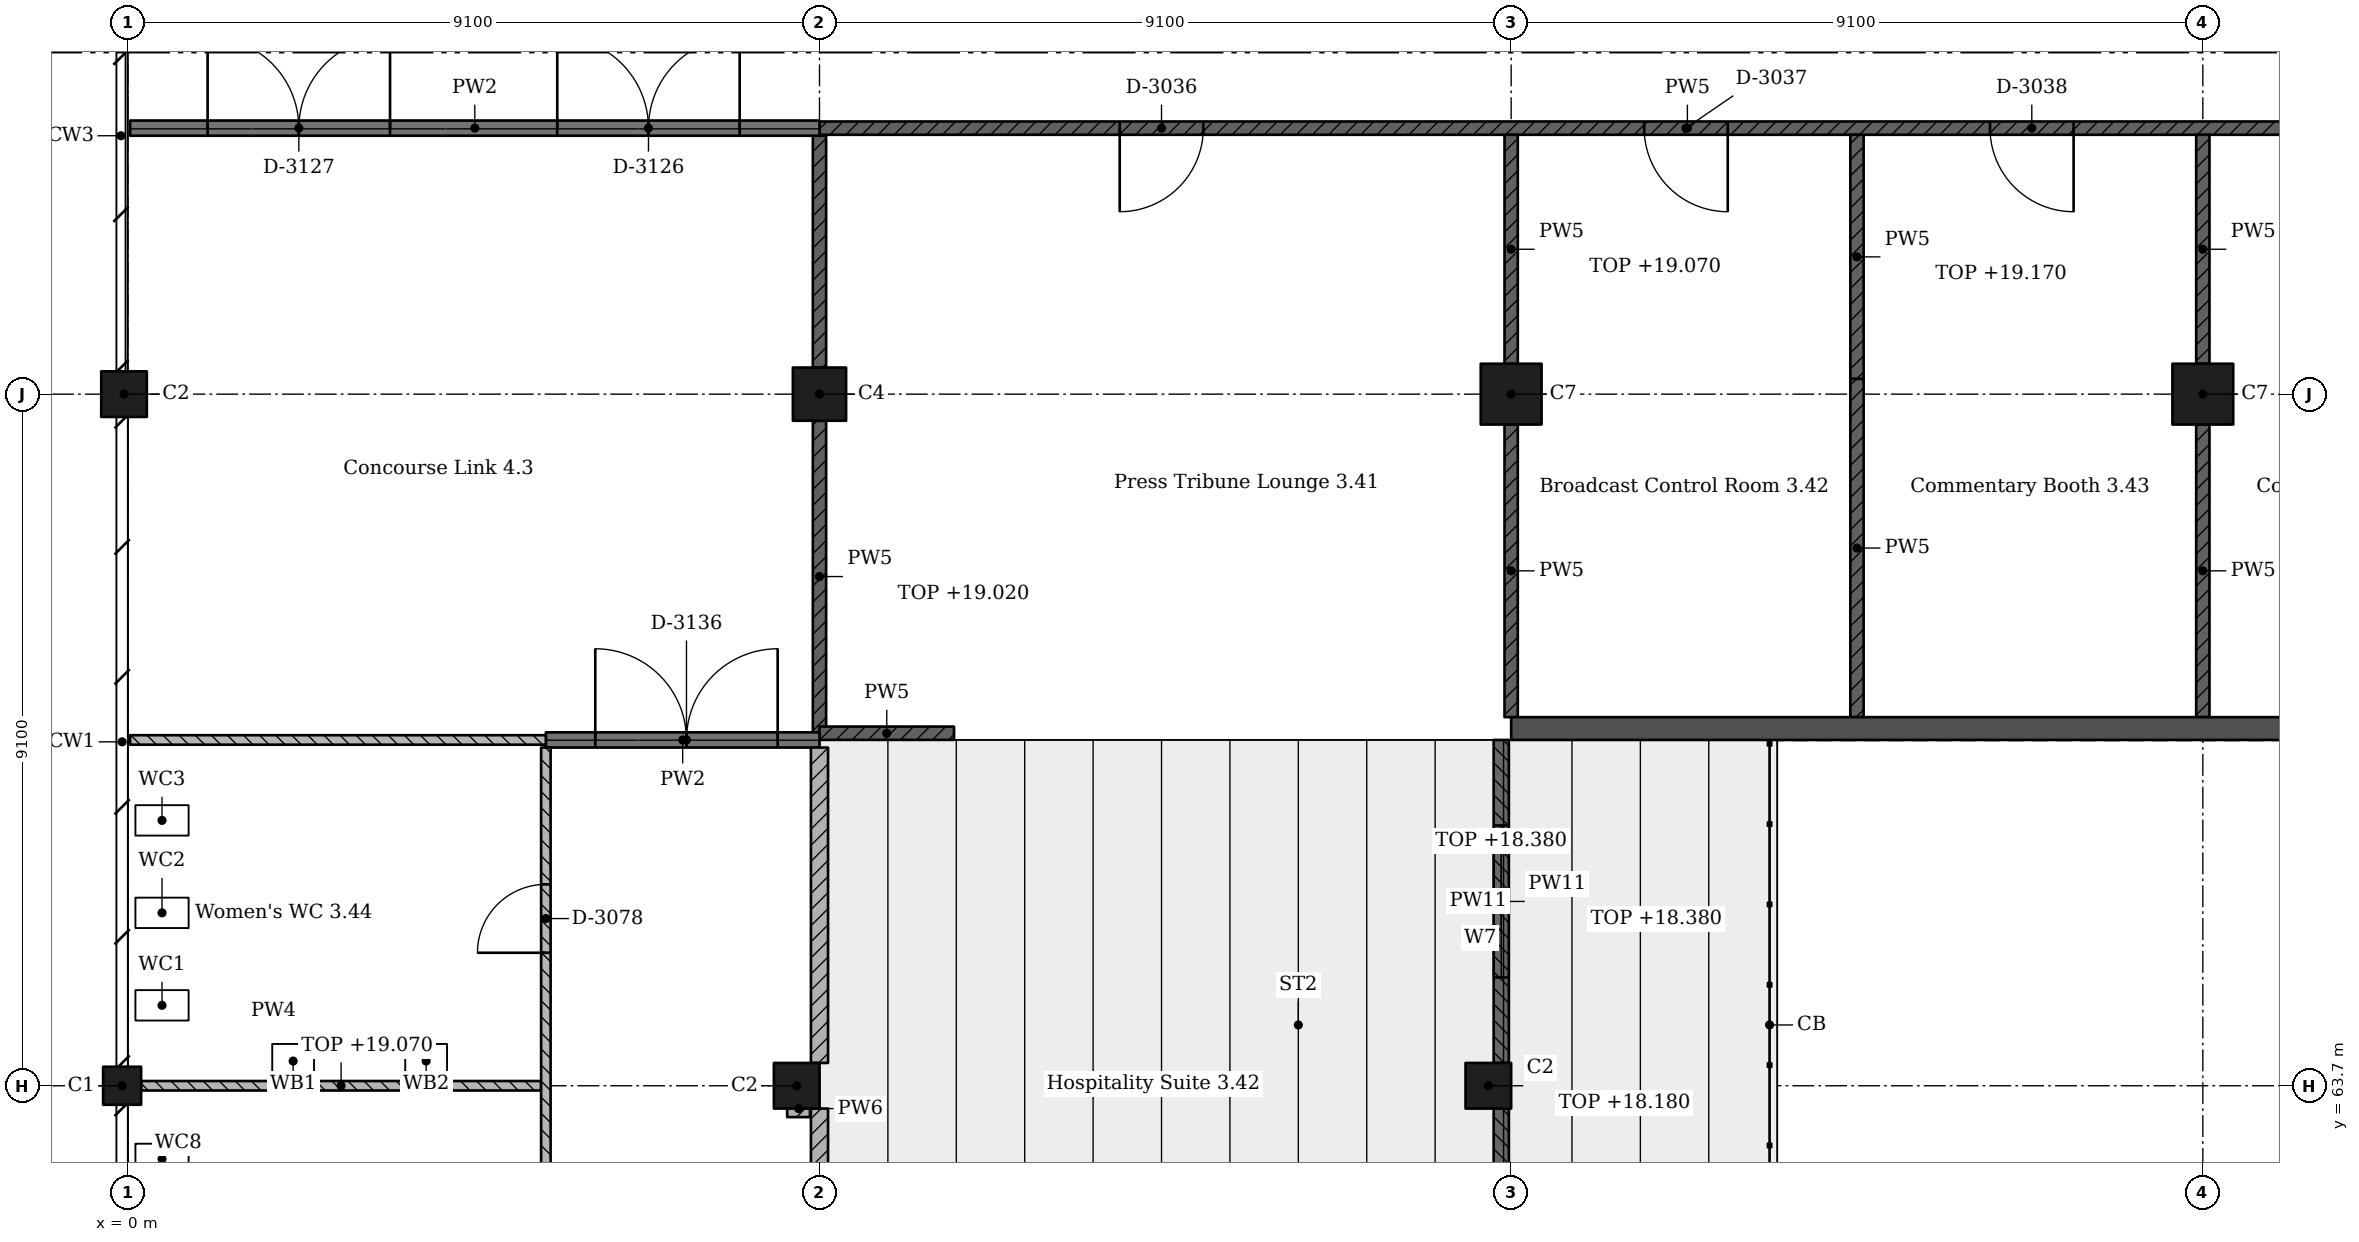
"""IFC4 building model, lengths in metres.
Left out: names, types, materials, properties, quantities, classifications, styles, units other than length and angle.
Written with IfcOpenShell. Run it as: python <this file> out.ifc"""

import sys

from ifc_helpers import new_model, si_unit, direction, frame, frame_2d, origin, origin_2d, place, context, subcontext, project, spatial, rectangle, extrude, element, fill, save


model = new_model("IFC4")
c1 = context("Model", 3, precision=1e-05, world=origin(), true_north=direction((0.0, 1.0)))
c2 = subcontext(c1, "Body", "Model", "MODEL_VIEW")
j1 = project(units=[si_unit("LENGTHUNIT", "METRE"), si_unit("PLANEANGLEUNIT", "RADIAN")], contexts=[c1])
p1 = place(None, origin())
s1 = spatial("IfcSite", under=j1, at=p1, CompositionType="ELEMENT")
p2 = place(p1, origin())
s2 = spatial("IfcBuilding", under=s1, at=p2, CompositionType="ELEMENT")
p3 = place(p2, frame((0.0, 0.0, 15.47)))
s3 = spatial("IfcBuildingStorey", under=s2, at=p3, CompositionType="ELEMENT", Elevation=15.47)
p4 = place(p3, frame((-0.075, 63.7, 0.0), z_axis=(0.0, 0.0, 1.0), x_axis=(1.0, 0.0, 0.0)))
e1 = element("IfcColumn", 1, at=p4, inside=s3, PredefinedType="COLUMN", context=c2, shape_type="SweptSolid", body=[
    extrude(rectangle(XDim=0.5, YDim=0.5, at=origin_2d()), origin(), (0.0, 0.0, 1.0), 4.55),
])
for number, where, z_axis, x_axis in (
    (2, (-0.05, 72.8, 0.0), (0.0, 0.0, 1.0), (1.0, 0.0, 0.0)),
    (3, (8.8, 63.7, 0.0), (0.0, 0.0, 1.0), (1.0, 0.0, 0.0)),
):
    element("IfcColumn", number, at=place(p3, frame(where, z_axis=z_axis, x_axis=x_axis)), inside=s3, PredefinedType="COLUMN", context=c2, shape_type="SweptSolid", body=[
        extrude(rectangle(XDim=0.6, YDim=0.6, at=origin_2d()), origin(), (0.0, 0.0, 1.0), 4.55),
    ])
p5 = place(p3, frame((9.1, 72.8, 0.0), z_axis=(0.0, 0.0, 1.0), x_axis=(1.0, 0.0, 0.0)))
e4 = element("IfcColumn", 4, at=p5, inside=s3, PredefinedType="COLUMN", context=c2, shape_type="SweptSolid", body=[
    extrude(rectangle(XDim=0.7, YDim=0.7, at=origin_2d()), origin(), (0.0, 0.0, 1.0), 4.55),
])
p6 = place(p3, frame((17.9, 63.7, 0.0), z_axis=(0.0, 0.0, 1.0), x_axis=(1.0, 0.0, 0.0)))
e5 = element("IfcColumn", 5, at=p6, inside=s3, PredefinedType="COLUMN", context=c2, shape_type="SweptSolid", body=[
    extrude(rectangle(XDim=0.6, YDim=0.6, at=origin_2d()), origin(), (0.0, 0.0, 1.0), 2.71),
])
for number, where, z_axis, x_axis in (
    (6, (18.2, 72.8, 0.0), (0.0, 0.0, 1.0), (1.0, 0.0, 0.0)),
    (7, (27.3, 72.8, 0.0), (0.0, 0.0, 1.0), (1.0, 0.0, 0.0)),
):
    element("IfcColumn", number, at=place(p3, frame(where, z_axis=z_axis, x_axis=x_axis)), inside=s3, PredefinedType="COLUMN", context=c2, shape_type="SweptSolid", body=[
        extrude(rectangle(XDim=0.8, YDim=0.8, at=origin_2d()), origin(), (0.0, 0.0, 1.0), 4.55),
    ])
p7 = place(p3, frame((40.95, 68.4, 0.0), z_axis=(0.0, 0.0, 1.0), x_axis=(-1.0, 0.0, 0.0)))
e8 = element("IfcWall", 8, at=p7, inside=s3, PredefinedType="SHEAR", context=c2, shape_type="SweptSolid", body=[
    extrude(rectangle(XDim=22.75, YDim=0.3, at=frame_2d((11.375, 0.0))), origin(), (0.0, 0.0, 1.0), 4.55),
])
p8 = place(p3, frame((0.175, 63.7, 0.0), z_axis=(0.0, 0.0, 1.0), x_axis=(1.0, 0.0, 0.0)))
e9 = element("IfcWall", 9, at=p8, inside=s3, PredefinedType="PARTITIONING", context=c2, shape_type="SweptSolid", body=[
    extrude(rectangle(XDim=5.262, YDim=0.125, at=frame_2d((2.631, 0.0))), origin(), (0.0, 0.0, 1.0), 3.6),
])
p9 = place(p3, frame((5.5, 54.6, 0.0), z_axis=(0.0, 0.0, 1.0), x_axis=(0.0, 1.0, 0.0)))
e10 = element("IfcWall", 10, at=p9, inside=s3, PredefinedType="PARTITIONING", context=c2, shape_type="SweptSolid", body=[
    extrude(rectangle(XDim=13.55, YDim=0.125, at=frame_2d((6.775, 0.0))), origin(), (0.0, 0.0, 1.0), 4.3),
])
p10 = place(p9, frame((4.05, 0.0, 0.0)))
e11 = element("IfcOpeningElement", 11, at=p10, cuts=e10, PredefinedType="OPENING", context=c2, shape_type="SweptSolid", body=[
    extrude(rectangle(XDim=0.9, YDim=2.1, at=frame_2d((0.45, 1.05))), frame((0.0, 0.073, 0.0), z_axis=(0.0, -1.0, 0.0), x_axis=(1.0, 0.0, 0.0)), (0.0, 0.0, 1.0), 0.145),
])
p11 = place(p9, frame((10.85, 0.0, 0.0)))
e12 = element("IfcOpeningElement", 12, at=p11, cuts=e10, PredefinedType="OPENING", context=c2, shape_type="SweptSolid", body=[
    extrude(rectangle(XDim=0.9, YDim=2.1, at=frame_2d((0.45, 1.05))), frame((0.0, 0.073, 0.0), z_axis=(0.0, -1.0, 0.0), x_axis=(1.0, 0.0, 0.0)), (0.0, 0.0, 1.0), 0.145),
])
p12 = place(p3, frame((5.5, 68.25, 0.0), z_axis=(0.0, 0.0, 1.0), x_axis=(-1.0, 0.0, 0.0)))
e13 = element("IfcWall", 13, at=p12, inside=s3, PredefinedType="PARTITIONING", context=c2, shape_type="SweptSolid", body=[
    extrude(rectangle(XDim=5.47, YDim=0.125, at=frame_2d((2.735, 0.0))), origin(), (0.0, 0.0, 1.0), 4.3),
])
p13 = place(p3, frame((8.675, 63.4, 0.0), z_axis=(0.0, 0.0, 1.0), x_axis=(1.0, 0.0, 0.0)))
e14 = element("IfcWall", 14, at=p13, inside=s3, PredefinedType="PARTITIONING", context=c2, shape_type="SweptSolid", body=[
    extrude(rectangle(XDim=0.3, YDim=0.225, at=frame_2d((0.15, 0.0))), origin(), (0.0, 0.0, 1.0), 4.3),
])
p14 = place(p3, frame((9.1, 63.4, 0.0), z_axis=(0.0, 0.0, 1.0), x_axis=(0.0, -1.0, 0.0)))
e15 = element("IfcWall", 15, at=p14, inside=s3, PredefinedType="PARTITIONING", context=c2, shape_type="SweptSolid", body=[
    extrude(rectangle(XDim=8.5, YDim=0.225, at=frame_2d((4.25, 0.0))), origin(), (0.0, 0.0, 1.0), 3.55),
])
p15 = place(p14, frame((3.75, 0.0, 0.0)))
e16 = element("IfcOpeningElement", 16, at=p15, cuts=e15, PredefinedType="OPENING", context=c2, shape_type="SweptSolid", body=[
    extrude(rectangle(XDim=1.0, YDim=2.4, at=frame_2d((0.5, 1.2))), frame((0.0, 0.123, 0.0), z_axis=(0.0, -1.0, 0.0), x_axis=(1.0, 0.0, 0.0)), (0.0, 0.0, 1.0), 0.245),
])
p16 = place(p3, frame((9.1, 68.15, 0.0), z_axis=(0.0, 0.0, 1.0), x_axis=(0.0, -1.0, 0.0)))
e17 = element("IfcWall", 17, at=p16, inside=s3, PredefinedType="PARTITIONING", context=c2, shape_type="SweptSolid", body=[
    extrude(rectangle(XDim=4.15, YDim=0.225, at=frame_2d((2.075, 0.0))), origin(), (0.0, 0.0, 1.0), 3.55),
])
p17 = place(p3, frame((9.1, 68.25, 0.0), z_axis=(0.0, 0.0, 1.0), x_axis=(-1.0, 0.0, 0.0)))
e18 = element("IfcWall", 18, at=p17, inside=s3, PredefinedType="PARTITIONING", context=c2, shape_type="SweptSolid", body=[
    extrude(rectangle(XDim=3.6, YDim=0.2, at=frame_2d((1.8, 0.0))), origin(), (0.0, 0.0, 1.0), 4.3),
])
p18 = place(p17, frame((0.55, 0.0, 0.0)))
e19 = element("IfcOpeningElement", 19, at=p18, cuts=e18, PredefinedType="OPENING", context=c2, shape_type="SweptSolid", body=[
    extrude(rectangle(XDim=2.4, YDim=2.4, at=frame_2d((1.2, 1.2))), frame((0.0, 0.11, 0.0), z_axis=(0.0, -1.0, 0.0), x_axis=(1.0, 0.0, 0.0)), (0.0, 0.0, 1.0), 0.22),
])
p19 = place(p3, frame((9.1, 68.35, 0.0), z_axis=(0.0, 0.0, 1.0), x_axis=(0.0, 1.0, 0.0)))
e20 = element("IfcWall", 20, at=p19, inside=s3, PredefinedType="PARTITIONING", context=c2, shape_type="SweptSolid", body=[
    extrude(rectangle(XDim=4.1, YDim=0.175, at=frame_2d((2.05, 0.0))), origin(), (0.0, 0.0, 1.0), 3.55),
])
p20 = place(p3, frame((9.1, 73.15, 0.0), z_axis=(0.0, 0.0, 1.0), x_axis=(0.0, 1.0, 0.0)))
e21 = element("IfcWall", 21, at=p20, inside=s3, PredefinedType="PARTITIONING", context=c2, shape_type="SweptSolid", body=[
    extrude(rectangle(XDim=3.05, YDim=0.175, at=frame_2d((1.525, 0.0))), origin(), (0.0, 0.0, 1.0), 3.55),
])
p21 = place(p3, frame((9.1, 76.3, 0.0), z_axis=(0.0, 0.0, 1.0), x_axis=(-1.0, 0.0, 0.0)))
e22 = element("IfcWall", 22, at=p21, inside=s3, PredefinedType="PARTITIONING", context=c2, shape_type="SweptSolid", body=[
    extrude(rectangle(XDim=9.07, YDim=0.2, at=frame_2d((4.535, 0.0))), origin(), (0.0, 0.0, 1.0), 4.3),
])
p22 = place(p21, frame((1.05, 0.0, 0.0)))
e23 = element("IfcOpeningElement", 23, at=p22, cuts=e22, PredefinedType="OPENING", context=c2, shape_type="SweptSolid", body=[
    extrude(rectangle(XDim=2.4, YDim=2.4, at=frame_2d((1.2, 1.2))), frame((0.0, 0.11, 0.0), z_axis=(0.0, -1.0, 0.0), x_axis=(1.0, 0.0, 0.0)), (0.0, 0.0, 1.0), 0.22),
])
p23 = place(p21, frame((5.65, 0.0, 0.0)))
e24 = element("IfcOpeningElement", 24, at=p23, cuts=e22, PredefinedType="OPENING", context=c2, shape_type="SweptSolid", body=[
    extrude(rectangle(XDim=2.4, YDim=2.4, at=frame_2d((1.2, 1.2))), frame((0.0, 0.11, 0.0), z_axis=(0.0, -1.0, 0.0), x_axis=(1.0, 0.0, 0.0)), (0.0, 0.0, 1.0), 0.22),
])
p24 = place(p3, frame((9.1, 76.3, 0.0), z_axis=(0.0, 0.0, 1.0), x_axis=(1.0, 0.0, 0.0)))
e25 = element("IfcWall", 25, at=p24, inside=s3, PredefinedType="PARTITIONING", context=c2, shape_type="SweptSolid", body=[
    extrude(rectangle(XDim=22.837, YDim=0.175, at=frame_2d((11.419, 0.0))), origin(), (0.0, 0.0, 1.0), 4.3),
])
p25 = place(p24, frame((3.95, 0.0, 0.0)))
e26 = element("IfcOpeningElement", 26, at=p25, cuts=e25, PredefinedType="OPENING", context=c2, shape_type="SweptSolid", body=[
    extrude(rectangle(XDim=1.1, YDim=2.4, at=frame_2d((0.55, 1.2))), frame((0.0, 0.097, 0.0), z_axis=(0.0, -1.0, 0.0), x_axis=(1.0, 0.0, 0.0)), (0.0, 0.0, 1.0), 0.195),
])
p26 = place(p24, frame((10.85, 0.0, 0.0)))
e27 = element("IfcOpeningElement", 27, at=p26, cuts=e25, PredefinedType="OPENING", context=c2, shape_type="SweptSolid", body=[
    extrude(rectangle(XDim=1.1, YDim=2.4, at=frame_2d((0.55, 1.2))), frame((0.0, 0.097, 0.0), z_axis=(0.0, -1.0, 0.0), x_axis=(1.0, 0.0, 0.0)), (0.0, 0.0, 1.0), 0.195),
])
p27 = place(p24, frame((15.4, 0.0, 0.0)))
e28 = element("IfcOpeningElement", 28, at=p27, cuts=e25, PredefinedType="OPENING", context=c2, shape_type="SweptSolid", body=[
    extrude(rectangle(XDim=1.1, YDim=2.4, at=frame_2d((0.55, 1.2))), frame((0.0, 0.097, 0.0), z_axis=(0.0, -1.0, 0.0), x_axis=(1.0, 0.0, 0.0)), (0.0, 0.0, 1.0), 0.195),
])
p28 = place(p24, frame((19.95, 0.0, 0.0)))
e29 = element("IfcOpeningElement", 29, at=p28, cuts=e25, PredefinedType="OPENING", context=c2, shape_type="SweptSolid", body=[
    extrude(rectangle(XDim=1.1, YDim=2.4, at=frame_2d((0.55, 1.2))), frame((0.0, 0.097, 0.0), z_axis=(0.0, -1.0, 0.0), x_axis=(1.0, 0.0, 0.0)), (0.0, 0.0, 1.0), 0.195),
])
p29 = place(p3, frame((10.87, 68.338, 0.0), z_axis=(0.0, 0.0, 1.0), x_axis=(-1.0, 0.0, 0.0)))
e30 = element("IfcWall", 30, at=p29, inside=s3, PredefinedType="PARTITIONING", context=c2, shape_type="SweptSolid", body=[
    extrude(rectangle(XDim=1.77, YDim=0.175, at=frame_2d((0.885, 0.0))), origin(), (0.0, 0.0, 1.0), 4.3),
])
p30 = place(p3, frame((18.2, 72.4, 0.0), z_axis=(0.0, 0.0, 1.0), x_axis=(0.0, -1.0, 0.0)))
e31 = element("IfcWall", 31, at=p30, inside=s3, PredefinedType="PARTITIONING", context=c2, shape_type="SweptSolid", body=[
    extrude(rectangle(XDim=3.85, YDim=0.175, at=frame_2d((1.925, 0.0))), origin(), (0.0, 0.0, 1.0), 4.3),
])
p31 = place(p3, frame((18.2, 76.212, 0.0), z_axis=(0.0, 0.0, 1.0), x_axis=(0.0, -1.0, 0.0)))
e32 = element("IfcWall", 32, at=p31, inside=s3, PredefinedType="PARTITIONING", context=c2, shape_type="SweptSolid", body=[
    extrude(rectangle(XDim=3.012, YDim=0.175, at=frame_2d((1.506, 0.0))), origin(), (0.0, 0.0, 1.0), 3.6),
])
p32 = place(p3, frame((22.75, 76.212, 0.0), z_axis=(0.0, 0.0, 1.0), x_axis=(0.0, -1.0, 0.0)))
e33 = element("IfcWall", 33, at=p32, inside=s3, PredefinedType="PARTITIONING", context=c2, shape_type="SweptSolid", body=[
    extrude(rectangle(XDim=3.212, YDim=0.175, at=frame_2d((1.606, 0.0))), origin(), (0.0, 0.0, 1.0), 3.7),
])
p33 = place(p3, frame((27.3, 72.4, 0.0), z_axis=(0.0, 0.0, 1.0), x_axis=(0.0, -1.0, 0.0)))
e34 = element("IfcWall", 34, at=p33, inside=s3, PredefinedType="PARTITIONING", context=c2, shape_type="SweptSolid", body=[
    extrude(rectangle(XDim=3.85, YDim=0.175, at=frame_2d((1.925, 0.0))), origin(), (0.0, 0.0, 1.0), 4.3),
])
p34 = place(p3, frame((27.3, 76.212, 0.0), z_axis=(0.0, 0.0, 1.0), x_axis=(0.0, -1.0, 0.0)))
e35 = element("IfcWall", 35, at=p34, inside=s3, PredefinedType="PARTITIONING", context=c2, shape_type="SweptSolid", body=[
    extrude(rectangle(XDim=3.012, YDim=0.175, at=frame_2d((1.506, 0.0))), origin(), (0.0, 0.0, 1.0), 3.6),
])
p35 = place(p3, frame((18.07, 68.25, 0.0), z_axis=(0.0, 0.0, 1.0), x_axis=(0.0, -1.0, 0.0)))
e36 = element("IfcWall", 36, at=p35, inside=s3, PredefinedType="PARTITIONING", context=c2, shape_type="SweptSolid", body=[
    extrude(rectangle(XDim=4.25, YDim=0.2, at=frame_2d((2.125, 0.0))), origin(), (0.0, 0.0, 1.0), 2.91),
])
p36 = place(p35, frame((1.125, 0.0, 1.1)))
e37 = element("IfcOpeningElement", 37, at=p36, cuts=e36, PredefinedType="OPENING", context=c2, shape_type="SweptSolid", body=[
    extrude(rectangle(XDim=2.0, YDim=1.3, at=frame_2d((1.0, 0.65))), frame((0.0, 0.11, 0.0), z_axis=(0.0, -1.0, 0.0), x_axis=(1.0, 0.0, 0.0)), (0.0, 0.0, 1.0), 0.22),
])
p37 = place(p3, frame((18.07, 63.4, 0.0), z_axis=(0.0, 0.0, 1.0), x_axis=(0.0, -1.0, 0.0)))
e38 = element("IfcWall", 38, at=p37, inside=s3, PredefinedType="PARTITIONING", context=c2, shape_type="SweptSolid", body=[
    extrude(rectangle(XDim=8.5, YDim=0.2, at=frame_2d((4.25, 0.0))), origin(), (0.0, 0.0, 1.0), 2.71),
])
p38 = place(p37, frame((1.25, 0.0, 1.1)))
e39 = element("IfcOpeningElement", 39, at=p38, cuts=e38, PredefinedType="OPENING", context=c2, shape_type="SweptSolid", body=[
    extrude(rectangle(XDim=6.0, YDim=1.3, at=frame_2d((3.0, 0.65))), frame((0.0, 0.11, 0.0), z_axis=(0.0, -1.0, 0.0), x_axis=(1.0, 0.0, 0.0)), (0.0, 0.0, 1.0), 0.22),
])
p39 = place(p3, frame((22.75, 73.0, 0.0), z_axis=(0.0, 0.0, 1.0), x_axis=(0.0, -1.0, 0.0)))
e40 = element("IfcWall", 40, at=p39, inside=s3, PredefinedType="PARTITIONING", context=c2, shape_type="SweptSolid", body=[
    extrude(rectangle(XDim=4.45, YDim=0.175, at=frame_2d((2.225, 0.0))), origin(), (0.0, 0.0, 1.0), 4.3),
])
p40 = place(p36, origin())
e41 = element("IfcWindow", 41, at=p40, inside=s3, PartitioningType="SINGLE_PANEL", PredefinedType="WINDOW", context=c2, shape_type="SweptSolid", body=[
    extrude(rectangle(XDim=2.0, YDim=1.3, at=frame_2d((1.0, 0.65))), frame((0.0, 0.03, 0.0), z_axis=(0.0, -1.0, 0.0), x_axis=(1.0, 0.0, 0.0)), (0.0, 0.0, 1.0), 0.06),
])
fill(e37, e41)
p41 = place(p25, origin())
e42 = element("IfcDoor", 42, at=p41, inside=s3, OperationType="SINGLE_SWING_LEFT", PredefinedType="DOOR", context=c2, shape_type="SweptSolid", body=[
    extrude(rectangle(XDim=1.1, YDim=2.4, at=frame_2d((0.55, 1.2))), frame((0.0, 0.025, 0.0), z_axis=(0.0, -1.0, 0.0), x_axis=(1.0, 0.0, 0.0)), (0.0, 0.0, 1.0), 0.05),
])
fill(e26, e42)
p42 = place(p26, origin())
e43 = element("IfcDoor", 43, at=p42, inside=s3, OperationType="SINGLE_SWING_RIGHT", PredefinedType="DOOR", context=c2, shape_type="SweptSolid", body=[
    extrude(rectangle(XDim=1.1, YDim=2.4, at=frame_2d((0.55, 1.2))), frame((0.0, 0.025, 0.0), z_axis=(0.0, -1.0, 0.0), x_axis=(1.0, 0.0, 0.0)), (0.0, 0.0, 1.0), 0.05),
])
fill(e27, e43)
p43 = place(p27, origin())
e44 = element("IfcDoor", 44, at=p43, inside=s3, OperationType="SINGLE_SWING_RIGHT", PredefinedType="DOOR", context=c2, shape_type="SweptSolid", body=[
    extrude(rectangle(XDim=1.1, YDim=2.4, at=frame_2d((0.55, 1.2))), frame((0.0, 0.025, 0.0), z_axis=(0.0, -1.0, 0.0), x_axis=(1.0, 0.0, 0.0)), (0.0, 0.0, 1.0), 0.05),
])
fill(e28, e44)
p44 = place(p11, origin())
e45 = element("IfcDoor", 45, at=p44, inside=s3, OperationType="SINGLE_SWING_RIGHT", PredefinedType="DOOR", context=c2, shape_type="SweptSolid", body=[
    extrude(rectangle(XDim=0.9, YDim=2.1, at=frame_2d((0.45, 1.05))), frame((0.0, 0.025, 0.0), z_axis=(0.0, -1.0, 0.0), x_axis=(1.0, 0.0, 0.0)), (0.0, 0.0, 1.0), 0.05),
])
fill(e12, e45)
p45 = place(p22, origin())
e46 = element("IfcDoor", 46, at=p45, inside=s3, OperationType="DOUBLE_DOOR_SINGLE_SWING", PredefinedType="DOOR", context=c2, shape_type="SweptSolid", body=[
    extrude(rectangle(XDim=2.4, YDim=2.4, at=frame_2d((1.2, 1.2))), frame((0.0, 0.025, 0.0), z_axis=(0.0, -1.0, 0.0), x_axis=(1.0, 0.0, 0.0)), (0.0, 0.0, 1.0), 0.05),
])
fill(e23, e46)
p46 = place(p23, origin())
e47 = element("IfcDoor", 47, at=p46, inside=s3, OperationType="DOUBLE_DOOR_SINGLE_SWING", PredefinedType="DOOR", context=c2, shape_type="SweptSolid", body=[
    extrude(rectangle(XDim=2.4, YDim=2.4, at=frame_2d((1.2, 1.2))), frame((0.0, 0.025, 0.0), z_axis=(0.0, -1.0, 0.0), x_axis=(1.0, 0.0, 0.0)), (0.0, 0.0, 1.0), 0.05),
])
fill(e24, e47)
p47 = place(p18, origin())
e48 = element("IfcDoor", 48, at=p47, inside=s3, OperationType="DOUBLE_DOOR_SINGLE_SWING", PredefinedType="DOOR", context=c2, shape_type="SweptSolid", body=[
    extrude(rectangle(XDim=2.4, YDim=2.4, at=frame_2d((1.2, 1.2))), frame((0.0, 0.025, 0.0), z_axis=(0.0, -1.0, 0.0), x_axis=(1.0, 0.0, 0.0)), (0.0, 0.0, 1.0), 0.05),
])
fill(e19, e48)
save(model, sys.argv[1])
